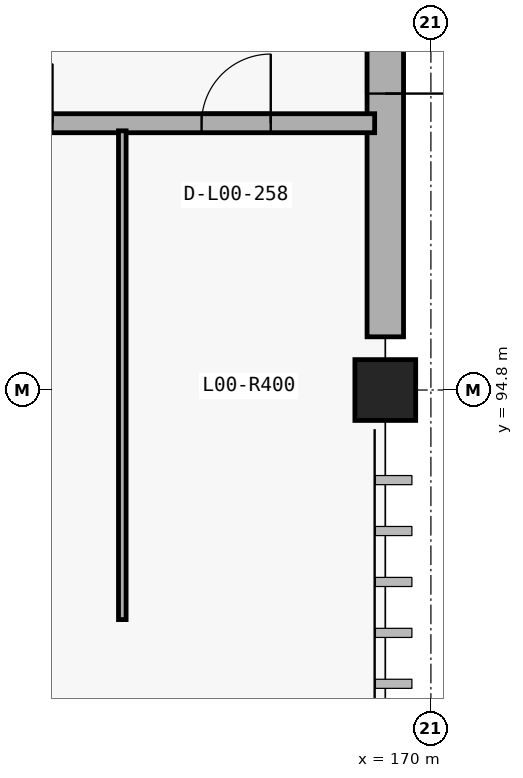
"""IFC4 building model, lengths in metres.
Left out: names, types, materials, properties, quantities, classifications, styles, units other than length and angle.
Written with IfcOpenShell. Run it as: python <this file> out.ifc"""

import sys

from ifc_helpers import new_model, si_unit, direction, frame, frame_2d, origin_with_axes, origin_2d_with_axis, place, context, subcontext, project, spatial, rectangle, circle, extrude, element, fill, save


model = new_model("IFC4")
c1 = context("Model", 3, precision=1e-05, world=origin_with_axes(), true_north=direction((0.0, 1.0)))
c2 = subcontext(c1, "Body", "Model", "MODEL_VIEW")
j1 = project(units=[si_unit("LENGTHUNIT", "METRE"), si_unit("PLANEANGLEUNIT", "RADIAN")], contexts=[c1])
p1 = place(None, origin_with_axes())
s1 = spatial("IfcSite", under=j1, at=p1, CompositionType="ELEMENT")
p2 = place(p1, origin_with_axes())
s2 = spatial("IfcBuilding", under=s1, at=p2, CompositionType="ELEMENT")
p3 = place(p2, origin_with_axes())
s3 = spatial("IfcBuildingStorey", under=s2, at=p3, CompositionType="ELEMENT", Elevation=0.0)
p4 = place(None, frame((169.4, 95.5, 0.0), z_axis=(0.0, 0.0, 1.0), x_axis=(0.0, 1.0, 0.0)))
e1 = element("IfcWall", 1, at=p4, inside=s3, PredefinedType="SOLIDWALL", context=c2, shape_type="SweptSolid", body=[
    extrude(rectangle(XDim=14.5, YDim=0.48, at=frame_2d((7.25, 0.0), x_axis=(1.0, 0.0))), origin_with_axes(), (0.0, 0.0, 1.0), 4.684),
])
p5 = place(None, frame((169.4, 99.65, 0.0), z_axis=(0.0, 0.0, 1.0), x_axis=(0.0, 1.0, 0.0)))
e2 = element("IfcOpeningElement", 2, at=p5, cuts=e1, PredefinedType="OPENING", context=c2, shape_type="SweptSolid", body=[
    extrude(rectangle(XDim=1.9, YDim=2.4, at=frame_2d((0.0, 1.2), x_axis=(1.0, 0.0))), frame((0.0, 0.25, 0.0), z_axis=(0.0, -1.0, 0.0), x_axis=(1.0, 0.0, 0.0)), (0.0, 0.0, 1.0), 0.5),
])
p6 = place(None, frame((169.4, 106.02, 0.0), z_axis=(0.0, 0.0, 1.0), x_axis=(0.0, 1.0, 0.0)))
e3 = element("IfcOpeningElement", 3, at=p6, cuts=e1, PredefinedType="OPENING", context=c2, shape_type="SweptSolid", body=[
    extrude(rectangle(XDim=1.84, YDim=2.34, at=frame_2d((0.0, 1.17), x_axis=(1.0, 0.0))), frame((0.0, 0.25, 0.0), z_axis=(0.0, -1.0, 0.0), x_axis=(1.0, 0.0, 0.0)), (0.0, 0.0, 1.0), 0.5),
])
p7 = place(None, frame((162.22, 98.31, 0.0), z_axis=(0.0, 0.0, 1.0), x_axis=(1.0, 0.0, 0.0)))
e4 = element("IfcWall", 4, at=p7, inside=s3, PredefinedType="PARTITIONING", context=c2, shape_type="SweptSolid", body=[
    extrude(rectangle(XDim=7.04, YDim=0.25, at=frame_2d((3.52, 0.0), x_axis=(1.0, 0.0))), origin_with_axes(), (0.0, 0.0, 1.0), 5.08),
])
p8 = place(None, frame((164.242, 98.31, 0.0), z_axis=(0.0, 0.0, 1.0), x_axis=(1.0, 0.0, 0.0)))
e5 = element("IfcOpeningElement", 5, at=p8, cuts=e4, PredefinedType="OPENING", context=c2, shape_type="SweptSolid", body=[
    extrude(rectangle(XDim=1.56, YDim=2.28, at=frame_2d((0.0, 1.14), x_axis=(1.0, 0.0))), frame((0.0, 0.135, 0.0), z_axis=(0.0, -1.0, 0.0), x_axis=(1.0, 0.0, 0.0)), (0.0, 0.0, 1.0), 0.27),
])
p9 = place(None, frame((167.438, 98.31, 0.0), z_axis=(0.0, 0.0, 1.0), x_axis=(1.0, 0.0, 0.0)))
e6 = element("IfcOpeningElement", 6, at=p9, cuts=e4, PredefinedType="OPENING", context=c2, shape_type="SweptSolid", body=[
    extrude(rectangle(XDim=0.91, YDim=2.12, at=frame_2d((0.0, 1.06), x_axis=(1.0, 0.0))), frame((0.0, 0.135, 0.0), z_axis=(0.0, -1.0, 0.0), x_axis=(1.0, 0.0, 0.0)), (0.0, 0.0, 1.0), 0.27),
])
p10 = place(None, frame((165.94, 91.78, 0.0), z_axis=(0.0, 0.0, 1.0), x_axis=(0.0, 1.0, 0.0)))
e7 = element("IfcWall", 7, at=p10, inside=s3, PredefinedType="PARTITIONING", context=c2, shape_type="SweptSolid", body=[
    extrude(rectangle(XDim=6.43, YDim=0.1, at=frame_2d((3.215, 0.0), x_axis=(1.0, 0.0))), origin_with_axes(), (0.0, 0.0, 1.0), 5.08),
])
p11 = place(None, frame((169.4, 94.8, 0.0), z_axis=(0.0, 0.0, 1.0), x_axis=(1.0, 0.0, 0.0)))
e8 = element("IfcColumn", 8, at=p11, inside=s3, PredefinedType="COLUMN", context=c2, shape_type="SweptSolid", body=[
    extrude(circle(Radius=0.4, at=origin_2d_with_axis()), origin_with_axes(), (0.0, 0.0, 1.0), 5.4),
])
p12 = place(None, frame((169.4, 99.65, 0.0), z_axis=(0.0, 0.0, 1.0), x_axis=(0.0, -1.0, 0.0)))
e9 = element("IfcDoor", 9, at=p12, inside=s3, OperationType="DOUBLE_DOOR_SINGLE_SWING", PredefinedType="DOOR", context=c2, shape_type="SweptSolid", body=[
    extrude(rectangle(XDim=1.9, YDim=2.4, at=frame_2d((0.0, 1.2), x_axis=(1.0, 0.0))), frame((0.0, 0.04, 0.0), z_axis=(0.0, -1.0, 0.0), x_axis=(1.0, 0.0, 0.0)), (0.0, 0.0, 1.0), 0.08),
])
fill(e2, e9)
p13 = place(None, frame((167.438, 98.31, 0.0), z_axis=(0.0, 0.0, 1.0), x_axis=(1.0, 0.0, 0.0)))
e10 = element("IfcDoor", 10, at=p13, inside=s3, OperationType="SINGLE_SWING_RIGHT", PredefinedType="DOOR", context=c2, shape_type="SweptSolid", body=[
    extrude(rectangle(XDim=0.91, YDim=2.12, at=frame_2d((0.0, 1.06), x_axis=(1.0, 0.0))), frame((0.0, 0.04, 0.0), z_axis=(0.0, -1.0, 0.0), x_axis=(1.0, 0.0, 0.0)), (0.0, 0.0, 1.0), 0.08),
])
fill(e6, e10)
save(model, sys.argv[1])
